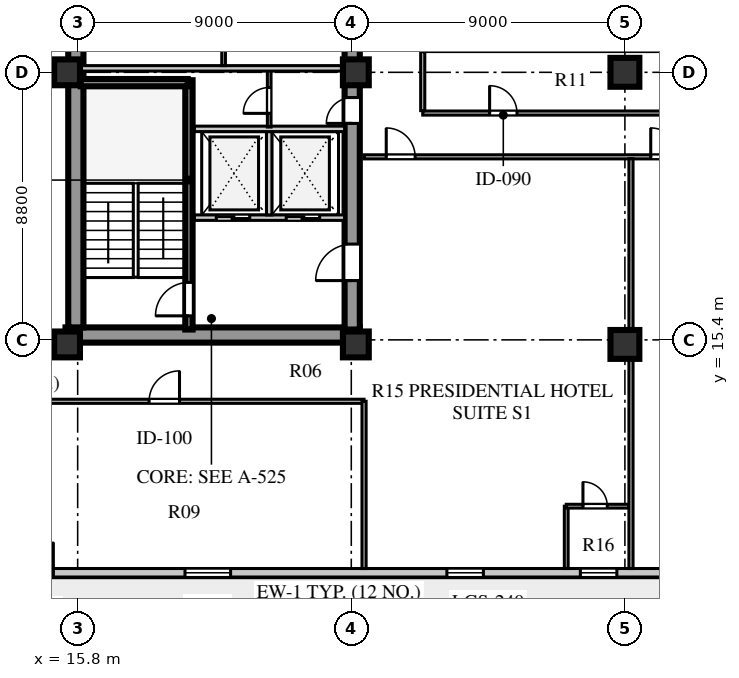
"""IFC4 building model, lengths in metres.
Left out: names, types, materials, properties, quantities, classifications, styles, units other than length and angle.
Written with IfcOpenShell. Run it as: python <this file> out.ifc"""

import sys

from ifc_helpers import new_model, si_unit, direction, frame, frame_2d, origin, origin_2d, place, context, subcontext, project, spatial, rectangle, extrude, element, fill, save


model = new_model("IFC4")
c1 = context("Model", 3, precision=1e-05, world=origin(), true_north=direction((0.0, 1.0)))
c2 = subcontext(c1, "Body", "Model", "MODEL_VIEW")
j1 = project(units=[si_unit("LENGTHUNIT", "METRE"), si_unit("PLANEANGLEUNIT", "RADIAN")], contexts=[c1])
p1 = place(None, origin())
s1 = spatial("IfcSite", under=j1, at=p1, CompositionType="ELEMENT")
p2 = place(p1, origin())
s2 = spatial("IfcBuilding", under=s1, at=p2, CompositionType="ELEMENT")
p3 = place(p2, frame((0.0, 0.0, 188.7)))
s3 = spatial("IfcBuildingStorey", under=s2, at=p3, CompositionType="ELEMENT", Elevation=188.7)
p4 = place(p3, frame((15.4, 15.56, 0.0), z_axis=(0.0, 0.0, 1.0), x_axis=(1.0, 0.0, 0.0)))
e1 = element("IfcWall", 1, at=p4, inside=s3, PredefinedType="SHEAR", context=c2, shape_type="SweptSolid", body=[
    extrude(rectangle(XDim=9.68, YDim=0.5, at=frame_2d((4.84, 0.0))), origin(), (0.0, 0.0, 1.0), 3.6),
])
p5 = place(p3, frame((15.74, 15.81, 0.0), z_axis=(0.0, 0.0, 1.0), x_axis=(0.0, 1.0, 0.0)))
e2 = element("IfcWall", 2, at=p5, inside=s3, PredefinedType="SHEAR", context=c2, shape_type="SweptSolid", body=[
    extrude(rectangle(XDim=25.63, YDim=0.5, at=frame_2d((12.815, 0.0))), origin(), (0.0, 0.0, 1.0), 3.6),
])
p6 = place(p3, frame((24.83, 15.74, 0.0), z_axis=(0.0, 0.0, 1.0), x_axis=(0.0, 1.0, 0.0)))
e3 = element("IfcWall", 3, at=p6, inside=s3, PredefinedType="SHEAR", context=c2, shape_type="SweptSolid", body=[
    extrude(rectangle(XDim=25.76, YDim=0.5, at=frame_2d((12.88, 0.0))), origin(), (0.0, 0.0, 1.0), 3.6),
])
p7 = place(p6, frame((1.61, 0.0, 0.0)))
e4 = element("IfcOpeningElement", 4, at=p7, cuts=e3, PredefinedType="OPENING", context=c2, shape_type="SweptSolid", body=[
    extrude(rectangle(XDim=1.2, YDim=2.1, at=frame_2d((0.6, 1.05))), frame((0.0, 0.26, 0.0), z_axis=(0.0, -1.0, 0.0), x_axis=(1.0, 0.0, 0.0)), (0.0, 0.0, 1.0), 0.52),
])
p8 = place(p6, frame((6.78, 0.0, 0.0)))
e5 = element("IfcOpeningElement", 5, at=p8, cuts=e3, PredefinedType="OPENING", context=c2, shape_type="SweptSolid", body=[
    extrude(rectangle(XDim=0.85, YDim=2.06, at=frame_2d((0.425, 1.03))), frame((0.0, 0.26, 0.0), z_axis=(0.0, -1.0, 0.0), x_axis=(1.0, 0.0, 0.0)), (0.0, 0.0, 1.0), 0.52),
])
p9 = place(p6, frame((12.11, 0.0, 0.0)))
e6 = element("IfcOpeningElement", 6, at=p9, cuts=e3, PredefinedType="OPENING", context=c2, shape_type="SweptSolid", body=[
    extrude(rectangle(XDim=1.5, YDim=2.12, at=frame_2d((0.75, 1.06))), frame((0.0, 0.26, 0.0), z_axis=(0.0, -1.0, 0.0), x_axis=(1.0, 0.0, 0.0)), (0.0, 0.0, 1.0), 0.52),
])
p10 = place(p6, frame((20.11, 0.0, 0.0)))
e7 = element("IfcOpeningElement", 7, at=p10, cuts=e3, PredefinedType="OPENING", context=c2, shape_type="SweptSolid", body=[
    extrude(rectangle(XDim=1.2, YDim=2.12, at=frame_2d((0.6, 1.06))), frame((0.0, 0.26, 0.0), z_axis=(0.0, -1.0, 0.0), x_axis=(1.0, 0.0, 0.0)), (0.0, 0.0, 1.0), 0.52),
])
p11 = place(p6, frame((24.01, 0.0, 0.0)))
e8 = element("IfcOpeningElement", 8, at=p11, cuts=e3, PredefinedType="OPENING", context=c2, shape_type="SweptSolid", body=[
    extrude(rectangle(XDim=0.95, YDim=2.1, at=frame_2d((0.475, 1.05))), frame((0.0, 0.26, 0.0), z_axis=(0.0, -1.0, 0.0), x_axis=(1.0, 0.0, 0.0)), (0.0, 0.0, 1.0), 0.52),
])
for number, where, z_axis, x_axis in (
    (9, (15.45, 15.25, 0.0), (0.0, 0.0, 1.0), (1.0, 0.0, 0.0)),
    (10, (15.45, 24.2, 0.0), (0.0, 0.0, 1.0), (1.0, 0.0, 0.0)),
    (11, (24.95, 15.25, 0.0), (0.0, 0.0, 1.0), (1.0, 0.0, 0.0)),
    (12, (24.95, 24.2, 0.0), (0.0, 0.0, 1.0), (1.0, 0.0, 0.0)),
):
    element("IfcColumn", number, at=place(p3, frame(where, z_axis=z_axis, x_axis=x_axis)), inside=s3, PredefinedType="COLUMN", context=c2, shape_type="SweptSolid", body=[
        extrude(rectangle(XDim=0.85, YDim=0.85, at=origin_2d()), origin(), (0.0, 0.0, 1.0), 3.6),
    ])
for number, where, z_axis, x_axis in (
    (13, (33.8, 15.25, 0.0), (0.0, 0.0, 1.0), (1.0, 0.0, 0.0)),
    (14, (33.8, 24.2, 0.0), (0.0, 0.0, 1.0), (1.0, 0.0, 0.0)),
):
    element("IfcColumn", number, at=place(p3, frame(where, z_axis=z_axis, x_axis=x_axis)), inside=s3, PredefinedType="COLUMN", context=c2, shape_type="SweptSolid", body=[
        extrude(rectangle(XDim=0.95, YDim=0.95, at=origin_2d()), origin(), (0.0, 0.0, 1.0), 3.6),
    ])
p12 = place(p3, frame((13.05, 7.74, 0.0), z_axis=(0.0, 0.0, 1.0), x_axis=(1.0, 0.0, 0.0)))
e15 = element("IfcWall", 15, at=p12, inside=s3, PredefinedType="STANDARD", context=c2, shape_type="SweptSolid", body=[
    extrude(rectangle(XDim=32.5, YDim=0.28, at=frame_2d((16.25, 0.0))), origin(), (0.0, 0.0, 1.0), 3.6),
])
p13 = place(p12, frame((0.95, 0.0, 0.0)))
e16 = element("IfcOpeningElement", 16, at=p13, cuts=e15, PredefinedType="OPENING", context=c2, shape_type="SweptSolid", body=[
    extrude(rectangle(XDim=1.0, YDim=2.05, at=frame_2d((0.5, 1.025))), frame((0.0, 0.15, 0.0), z_axis=(0.0, -1.0, 0.0), x_axis=(1.0, 0.0, 0.0)), (0.0, 0.0, 1.0), 0.3),
])
p14 = place(p12, frame((6.28, 0.0, 0.8)))
e17 = element("IfcOpeningElement", 17, at=p14, cuts=e15, PredefinedType="OPENING", context=c2, shape_type="SweptSolid", body=[
    extrude(rectangle(XDim=1.5, YDim=2.0, at=frame_2d((0.75, 1.0))), frame((0.0, 0.15, 0.0), z_axis=(0.0, -1.0, 0.0), x_axis=(1.0, 0.0, 0.0)), (0.0, 0.0, 1.0), 0.3),
])
p15 = place(p12, frame((14.895, 0.0, 0.8)))
e18 = element("IfcOpeningElement", 18, at=p15, cuts=e15, PredefinedType="OPENING", context=c2, shape_type="SweptSolid", body=[
    extrude(rectangle(XDim=1.2, YDim=1.75, at=frame_2d((0.6, 0.875))), frame((0.0, 0.15, 0.0), z_axis=(0.0, -1.0, 0.0), x_axis=(1.0, 0.0, 0.0)), (0.0, 0.0, 1.0), 0.3),
])
p16 = place(p12, frame((19.285, 0.0, 0.8)))
e19 = element("IfcOpeningElement", 19, at=p16, cuts=e15, PredefinedType="OPENING", context=c2, shape_type="SweptSolid", body=[
    extrude(rectangle(XDim=1.2, YDim=1.75, at=frame_2d((0.6, 0.875))), frame((0.0, 0.15, 0.0), z_axis=(0.0, -1.0, 0.0), x_axis=(1.0, 0.0, 0.0)), (0.0, 0.0, 1.0), 0.3),
])
p17 = place(p12, frame((22.205, 0.0, 0.8)))
e20 = element("IfcOpeningElement", 20, at=p17, cuts=e15, PredefinedType="OPENING", context=c2, shape_type="SweptSolid", body=[
    extrude(rectangle(XDim=2.1, YDim=1.95, at=frame_2d((1.05, 0.975))), frame((0.0, 0.15, 0.0), z_axis=(0.0, -1.0, 0.0), x_axis=(1.0, 0.0, 0.0)), (0.0, 0.0, 1.0), 0.3),
])
p18 = place(p12, frame((26.065, 0.0, 0.8)))
e21 = element("IfcOpeningElement", 21, at=p18, cuts=e15, PredefinedType="OPENING", context=c2, shape_type="SweptSolid", body=[
    extrude(rectangle(XDim=1.2, YDim=1.75, at=frame_2d((0.6, 0.875))), frame((0.0, 0.15, 0.0), z_axis=(0.0, -1.0, 0.0), x_axis=(1.0, 0.0, 0.0)), (0.0, 0.0, 1.0), 0.3),
])
p19 = place(p12, frame((29.255, 0.0, 0.8)))
e22 = element("IfcOpeningElement", 22, at=p19, cuts=e15, PredefinedType="OPENING", context=c2, shape_type="SweptSolid", body=[
    extrude(rectangle(XDim=1.65, YDim=1.95, at=frame_2d((0.825, 0.975))), frame((0.0, 0.15, 0.0), z_axis=(0.0, -1.0, 0.0), x_axis=(1.0, 0.0, 0.0)), (0.0, 0.0, 1.0), 0.3),
])
p20 = place(p3, frame((19.46, 15.74, 0.0), z_axis=(0.0, 0.0, 1.0), x_axis=(0.0, 1.0, 0.0)))
e23 = element("IfcWall", 23, at=p20, inside=s3, PredefinedType="SHEAR", context=c2, shape_type="SweptSolid", body=[
    extrude(rectangle(XDim=8.2, YDim=0.24, at=frame_2d((4.1, 0.0))), origin(), (0.0, 0.0, 1.0), 3.85),
])
p21 = place(p20, frame((0.45, 0.0, 0.0)))
e24 = element("IfcOpeningElement", 24, at=p21, cuts=e23, PredefinedType="OPENING", context=c2, shape_type="SweptSolid", body=[
    extrude(rectangle(XDim=1.1, YDim=2.1, at=frame_2d((0.55, 1.05))), frame((0.0, 0.13, 0.0), z_axis=(0.0, -1.0, 0.0), x_axis=(1.0, 0.0, 0.0)), (0.0, 0.0, 1.0), 0.26),
])
p22 = place(p3, frame((15.9, 23.86, 0.0), z_axis=(0.0, 0.0, 1.0), x_axis=(1.0, 0.0, 0.0)))
e25 = element("IfcWall", 25, at=p22, inside=s3, PredefinedType="SHEAR", context=c2, shape_type="SweptSolid", body=[
    extrude(rectangle(XDim=3.52, YDim=0.24, at=frame_2d((1.76, 0.0))), origin(), (0.0, 0.0, 1.0), 3.85),
])
p23 = place(p3, frame((19.64, 19.42, 0.0), z_axis=(0.0, 0.0, 1.0), x_axis=(1.0, 0.0, 0.0)))
e26 = element("IfcWall", 26, at=p23, inside=s3, PredefinedType="SOLIDWALL", context=c2, shape_type="SweptSolid", body=[
    extrude(rectangle(XDim=4.94, YDim=0.18, at=frame_2d((2.47, 0.0))), origin(), (0.0, 0.0, 1.0), 3.6),
])
p24 = place(p23, frame((0.72, 0.0, 0.0)))
e27 = element("IfcOpeningElement", 27, at=p24, cuts=e26, PredefinedType="OPENING", context=c2, shape_type="SweptSolid", body=[
    extrude(rectangle(XDim=1.1, YDim=2.1, at=frame_2d((0.55, 1.05))), frame((0.0, 0.1, 0.0), z_axis=(0.0, -1.0, 0.0), x_axis=(1.0, 0.0, 0.0)), (0.0, 0.0, 1.0), 0.2),
])
p25 = place(p23, frame((3.02, 0.0, 0.0)))
e28 = element("IfcOpeningElement", 28, at=p25, cuts=e26, PredefinedType="OPENING", context=c2, shape_type="SweptSolid", body=[
    extrude(rectangle(XDim=1.1, YDim=2.1, at=frame_2d((0.55, 1.05))), frame((0.0, 0.1, 0.0), z_axis=(0.0, -1.0, 0.0), x_axis=(1.0, 0.0, 0.0)), (0.0, 0.0, 1.0), 0.2),
])
p26 = place(p3, frame((22.1, 19.51, 0.0), z_axis=(0.0, 0.0, 1.0), x_axis=(0.0, 1.0, 0.0)))
e29 = element("IfcWall", 29, at=p26, inside=s3, PredefinedType="SOLIDWALL", context=c2, shape_type="SweptSolid", body=[
    extrude(rectangle(XDim=2.74, YDim=0.18, at=frame_2d((1.37, 0.0))), origin(), (0.0, 0.0, 1.0), 3.6),
])
p27 = place(p3, frame((19.64, 22.34, 0.0), z_axis=(0.0, 0.0, 1.0), x_axis=(1.0, 0.0, 0.0)))
e30 = element("IfcWall", 30, at=p27, inside=s3, PredefinedType="SOLIDWALL", context=c2, shape_type="SweptSolid", body=[
    extrude(rectangle(XDim=4.94, YDim=0.18, at=frame_2d((2.47, 0.0))), origin(), (0.0, 0.0, 1.0), 3.6),
])
p28 = place(p3, frame((22.1, 22.4, 0.0), z_axis=(0.0, 0.0, 1.0), x_axis=(0.0, 1.0, 0.0)))
e31 = element("IfcWall", 31, at=p28, inside=s3, PredefinedType="PARTITIONING", context=c2, shape_type="SweptSolid", body=[
    extrude(rectangle(XDim=1.88, YDim=0.12, at=frame_2d((0.94, 0.0))), origin(), (0.0, 0.0, 1.0), 3.6),
])
p29 = place(p28, frame((0.45, 0.0, 0.0)))
e32 = element("IfcOpeningElement", 32, at=p29, cuts=e31, PredefinedType="OPENING", context=c2, shape_type="SweptSolid", body=[
    extrude(rectangle(XDim=0.85, YDim=2.06, at=frame_2d((0.425, 1.03))), frame((0.0, 0.07, 0.0), z_axis=(0.0, -1.0, 0.0), x_axis=(1.0, 0.0, 0.0)), (0.0, 0.0, 1.0), 0.14),
])
p30 = place(p3, frame((15.9, 24.33, 0.0), z_axis=(0.0, 0.0, 1.0), x_axis=(1.0, 0.0, 0.0)))
e33 = element("IfcWall", 33, at=p30, inside=s3, PredefinedType="SOLIDWALL", context=c2, shape_type="SweptSolid", body=[
    extrude(rectangle(XDim=8.68, YDim=0.18, at=frame_2d((4.34, 0.0))), origin(), (0.0, 0.0, 1.0), 2.95),
])
p31 = place(p3, frame((20.6, 24.42, 0.0), z_axis=(0.0, 0.0, 1.0), x_axis=(0.0, 1.0, 0.0)))
e34 = element("IfcWall", 34, at=p31, inside=s3, PredefinedType="PARTITIONING", context=c2, shape_type="SweptSolid", body=[
    extrude(rectangle(XDim=2.02, YDim=0.12, at=frame_2d((1.01, 0.0))), origin(), (0.0, 0.0, 1.0), 3.6),
])
p32 = place(p3, frame((25.22, 21.42, 0.0), z_axis=(0.0, 0.0, 1.0), x_axis=(1.0, 0.0, 0.0)))
e35 = element("IfcWall", 35, at=p32, inside=s3, PredefinedType="PARTITIONING", context=c2, shape_type="SweptSolid", body=[
    extrude(rectangle(XDim=15.6, YDim=0.135, at=frame_2d((7.8, 0.0))), origin(), (0.0, 0.0, 1.0), 3.25),
])
p33 = place(p32, frame((0.73, 0.0, 0.0)))
e36 = element("IfcOpeningElement", 36, at=p33, cuts=e35, PredefinedType="OPENING", context=c2, shape_type="SweptSolid", body=[
    extrude(rectangle(XDim=0.95, YDim=2.1, at=frame_2d((0.475, 1.05))), frame((0.0, 0.078, 0.0), z_axis=(0.0, -1.0, 0.0), x_axis=(1.0, 0.0, 0.0)), (0.0, 0.0, 1.0), 0.155),
])
p34 = place(p32, frame((9.43, 0.0, 0.0)))
e37 = element("IfcOpeningElement", 37, at=p34, cuts=e35, PredefinedType="OPENING", context=c2, shape_type="SweptSolid", body=[
    extrude(rectangle(XDim=0.95, YDim=2.1, at=frame_2d((0.475, 1.05))), frame((0.0, 0.078, 0.0), z_axis=(0.0, -1.0, 0.0), x_axis=(1.0, 0.0, 0.0)), (0.0, 0.0, 1.0), 0.155),
])
p35 = place(p3, frame((27.15, 22.86, 0.0), z_axis=(0.0, 0.0, 1.0), x_axis=(1.0, 0.0, 0.0)))
e38 = element("IfcWall", 38, at=p35, inside=s3, PredefinedType="PARTITIONING", context=c2, shape_type="SweptSolid", body=[
    extrude(rectangle(XDim=13.67, YDim=0.135, at=frame_2d((6.835, 0.0))), origin(), (0.0, 0.0, 1.0), 3.6),
])
p36 = place(p35, frame((2.2, 0.0, 0.0)))
e39 = element("IfcOpeningElement", 39, at=p36, cuts=e38, PredefinedType="OPENING", context=c2, shape_type="SweptSolid", body=[
    extrude(rectangle(XDim=0.9, YDim=2.08, at=frame_2d((0.45, 1.04))), frame((0.0, 0.078, 0.0), z_axis=(0.0, -1.0, 0.0), x_axis=(1.0, 0.0, 0.0)), (0.0, 0.0, 1.0), 0.155),
])
p37 = place(p3, frame((13.39, 13.38, 0.0), z_axis=(0.0, 0.0, 1.0), x_axis=(1.0, 0.0, 0.0)))
e40 = element("IfcWall", 40, at=p37, inside=s3, PredefinedType="PARTITIONING", context=c2, shape_type="SweptSolid", body=[
    extrude(rectangle(XDim=11.83, YDim=0.135, at=frame_2d((5.915, 0.0))), origin(), (0.0, 0.0, 1.0), 3.6),
])
p38 = place(p37, frame((4.76, 0.0, 0.0)))
e41 = element("IfcOpeningElement", 41, at=p38, cuts=e40, PredefinedType="OPENING", context=c2, shape_type="SweptSolid", body=[
    extrude(rectangle(XDim=1.0, YDim=2.08, at=frame_2d((0.5, 1.04))), frame((0.0, 0.078, 0.0), z_axis=(0.0, -1.0, 0.0), x_axis=(1.0, 0.0, 0.0)), (0.0, 0.0, 1.0), 0.155),
])
p39 = place(p3, frame((25.22, 7.88, 0.0), z_axis=(0.0, 0.0, 1.0), x_axis=(0.0, 1.0, 0.0)))
e42 = element("IfcWall", 42, at=p39, inside=s3, PredefinedType="PARTITIONING", context=c2, shape_type="SweptSolid", body=[
    extrude(rectangle(XDim=5.5, YDim=0.135, at=frame_2d((2.75, 0.0))), origin(), (0.0, 0.0, 1.0), 3.15),
])
p40 = place(p3, frame((27.15, 22.94, 0.0), z_axis=(0.0, 0.0, 1.0), x_axis=(0.0, 1.0, 0.0)))
e43 = element("IfcWall", 43, at=p40, inside=s3, PredefinedType="PARTITIONING", context=c2, shape_type="SweptSolid", body=[
    extrude(rectangle(XDim=1.94, YDim=0.135, at=frame_2d((0.97, 0.0))), origin(), (0.0, 0.0, 1.0), 3.6),
])
p41 = place(p3, frame((31.87, 7.88, 0.0), z_axis=(0.0, 0.0, 1.0), x_axis=(0.0, 1.0, 0.0)))
e44 = element("IfcWall", 44, at=p41, inside=s3, PredefinedType="PLUMBINGWALL", context=c2, shape_type="SweptSolid", body=[
    extrude(rectangle(XDim=2.05, YDim=0.125, at=frame_2d((1.025, 0.0))), origin(), (0.0, 0.0, 1.0), 3.6),
])
p42 = place(p3, frame((31.87, 9.93, 0.0), z_axis=(0.0, 0.0, 1.0), x_axis=(1.0, 0.0, 0.0)))
e45 = element("IfcWall", 45, at=p42, inside=s3, PredefinedType="PLUMBINGWALL", context=c2, shape_type="SweptSolid", body=[
    extrude(rectangle(XDim=2.05, YDim=0.125, at=frame_2d((1.025, 0.0))), origin(), (0.0, 0.0, 1.0), 3.6),
])
p43 = place(p42, frame((0.55, 0.0, 0.0)))
e46 = element("IfcOpeningElement", 46, at=p43, cuts=e45, PredefinedType="OPENING", context=c2, shape_type="SweptSolid", body=[
    extrude(rectangle(XDim=0.8, YDim=2.05, at=frame_2d((0.4, 1.025))), frame((0.0, 0.073, 0.0), z_axis=(0.0, -1.0, 0.0), x_axis=(1.0, 0.0, 0.0)), (0.0, 0.0, 1.0), 0.145),
])
p44 = place(p3, frame((34.0, 7.88, 0.0), z_axis=(0.0, 0.0, 1.0), x_axis=(0.0, 1.0, 0.0)))
e47 = element("IfcWall", 47, at=p44, inside=s3, PredefinedType="PARTITIONING", context=c2, shape_type="SweptSolid", body=[
    extrude(rectangle(XDim=13.48, YDim=0.135, at=frame_2d((6.74, 0.0))), origin(), (0.0, 0.0, 1.0), 2.95),
])
p45 = place(p13, frame((1.0, 0.0, 0.0), z_axis=(0.0, 0.0, 1.0), x_axis=(-1.0, 0.0, 0.0)))
e48 = element("IfcDoor", 48, at=p45, inside=s3, OperationType="SINGLE_SWING_LEFT", PredefinedType="DOOR", context=c2, shape_type="SweptSolid", body=[
    extrude(rectangle(XDim=1.0, YDim=2.05, at=frame_2d((0.5, 1.025))), frame((0.0, 0.025, 0.0), z_axis=(0.0, -1.0, 0.0), x_axis=(1.0, 0.0, 0.0)), (0.0, 0.0, 1.0), 0.05),
])
fill(e16, e48)
p46 = place(p14, origin())
e49 = element("IfcWindow", 49, at=p46, inside=s3, PartitioningType="SINGLE_PANEL", PredefinedType="WINDOW", context=c2, shape_type="SweptSolid", body=[
    extrude(rectangle(XDim=1.5, YDim=2.0, at=frame_2d((0.75, 1.0))), frame((0.0, 0.03, 0.0), z_axis=(0.0, -1.0, 0.0), x_axis=(1.0, 0.0, 0.0)), (0.0, 0.0, 1.0), 0.06),
])
fill(e17, e49)
p47 = place(p15, origin())
e50 = element("IfcWindow", 50, at=p47, inside=s3, PartitioningType="SINGLE_PANEL", PredefinedType="WINDOW", context=c2, shape_type="SweptSolid", body=[
    extrude(rectangle(XDim=1.2, YDim=1.75, at=frame_2d((0.6, 0.875))), frame((0.0, 0.03, 0.0), z_axis=(0.0, -1.0, 0.0), x_axis=(1.0, 0.0, 0.0)), (0.0, 0.0, 1.0), 0.06),
])
fill(e18, e50)
p48 = place(p16, origin())
e51 = element("IfcWindow", 51, at=p48, inside=s3, PartitioningType="SINGLE_PANEL", PredefinedType="WINDOW", context=c2, shape_type="SweptSolid", body=[
    extrude(rectangle(XDim=1.2, YDim=1.75, at=frame_2d((0.6, 0.875))), frame((0.0, 0.03, 0.0), z_axis=(0.0, -1.0, 0.0), x_axis=(1.0, 0.0, 0.0)), (0.0, 0.0, 1.0), 0.06),
])
fill(e19, e51)
p49 = place(p21, origin())
e52 = element("IfcDoor", 52, at=p49, inside=s3, OperationType="SINGLE_SWING_LEFT", PredefinedType="DOOR", context=c2, shape_type="SweptSolid", body=[
    extrude(rectangle(XDim=1.1, YDim=2.1, at=frame_2d((0.55, 1.05))), frame((0.0, 0.025, 0.0), z_axis=(0.0, -1.0, 0.0), x_axis=(1.0, 0.0, 0.0)), (0.0, 0.0, 1.0), 0.05),
])
fill(e24, e52)
p50 = place(p24, origin())
e53 = element("IfcDoor", 53, at=p50, inside=s3, OperationType="DOUBLE_DOOR_SLIDING", PredefinedType="DOOR", context=c2, shape_type="SweptSolid", body=[
    extrude(rectangle(XDim=1.1, YDim=2.1, at=frame_2d((0.55, 1.05))), frame((0.0, 0.025, 0.0), z_axis=(0.0, -1.0, 0.0), x_axis=(1.0, 0.0, 0.0)), (0.0, 0.0, 1.0), 0.05),
])
fill(e27, e53)
p51 = place(p25, origin())
e54 = element("IfcDoor", 54, at=p51, inside=s3, OperationType="DOUBLE_DOOR_SLIDING", PredefinedType="DOOR", context=c2, shape_type="SweptSolid", body=[
    extrude(rectangle(XDim=1.1, YDim=2.1, at=frame_2d((0.55, 1.05))), frame((0.0, 0.025, 0.0), z_axis=(0.0, -1.0, 0.0), x_axis=(1.0, 0.0, 0.0)), (0.0, 0.0, 1.0), 0.05),
])
fill(e28, e54)
p52 = place(p7, frame((1.2, 0.0, 0.0), z_axis=(0.0, 0.0, 1.0), x_axis=(-1.0, 0.0, 0.0)))
e55 = element("IfcDoor", 55, at=p52, inside=s3, OperationType="SINGLE_SWING_RIGHT", PredefinedType="DOOR", context=c2, shape_type="SweptSolid", body=[
    extrude(rectangle(XDim=1.2, YDim=2.1, at=frame_2d((0.6, 1.05))), frame((0.0, 0.025, 0.0), z_axis=(0.0, -1.0, 0.0), x_axis=(1.0, 0.0, 0.0)), (0.0, 0.0, 1.0), 0.05),
])
fill(e4, e55)
p53 = place(p29, origin())
e56 = element("IfcDoor", 56, at=p53, inside=s3, OperationType="SINGLE_SWING_LEFT", PredefinedType="DOOR", context=c2, shape_type="SweptSolid", body=[
    extrude(rectangle(XDim=0.85, YDim=2.06, at=frame_2d((0.425, 1.03))), frame((0.0, 0.025, 0.0), z_axis=(0.0, -1.0, 0.0), x_axis=(1.0, 0.0, 0.0)), (0.0, 0.0, 1.0), 0.05),
])
fill(e32, e56)
p54 = place(p8, frame((0.85, 0.0, 0.0), z_axis=(0.0, 0.0, 1.0), x_axis=(-1.0, 0.0, 0.0)))
e57 = element("IfcDoor", 57, at=p54, inside=s3, OperationType="SINGLE_SWING_RIGHT", PredefinedType="DOOR", context=c2, shape_type="SweptSolid", body=[
    extrude(rectangle(XDim=0.85, YDim=2.06, at=frame_2d((0.425, 1.03))), frame((0.0, 0.025, 0.0), z_axis=(0.0, -1.0, 0.0), x_axis=(1.0, 0.0, 0.0)), (0.0, 0.0, 1.0), 0.05),
])
fill(e5, e57)
p55 = place(p38, frame((1.0, 0.0, 0.0), z_axis=(0.0, 0.0, 1.0), x_axis=(-1.0, 0.0, 0.0)))
e58 = element("IfcDoor", 58, at=p55, inside=s3, OperationType="SINGLE_SWING_LEFT", PredefinedType="DOOR", context=c2, shape_type="SweptSolid", body=[
    extrude(rectangle(XDim=1.0, YDim=2.08, at=frame_2d((0.5, 1.04))), frame((0.0, 0.025, 0.0), z_axis=(0.0, -1.0, 0.0), x_axis=(1.0, 0.0, 0.0)), (0.0, 0.0, 1.0), 0.05),
])
fill(e41, e58)
p56 = place(p36, origin())
e59 = element("IfcDoor", 59, at=p56, inside=s3, OperationType="SINGLE_SWING_LEFT", PredefinedType="DOOR", context=c2, shape_type="SweptSolid", body=[
    extrude(rectangle(XDim=0.9, YDim=2.08, at=frame_2d((0.45, 1.04))), frame((0.0, 0.025, 0.0), z_axis=(0.0, -1.0, 0.0), x_axis=(1.0, 0.0, 0.0)), (0.0, 0.0, 1.0), 0.05),
])
fill(e39, e59)
p57 = place(p33, frame((0.95, 0.0, 0.0), z_axis=(0.0, 0.0, 1.0), x_axis=(-1.0, 0.0, 0.0)))
e60 = element("IfcDoor", 60, at=p57, inside=s3, OperationType="SINGLE_SWING_RIGHT", PredefinedType="DOOR", context=c2, shape_type="SweptSolid", body=[
    extrude(rectangle(XDim=0.95, YDim=2.1, at=frame_2d((0.475, 1.05))), frame((0.0, 0.025, 0.0), z_axis=(0.0, -1.0, 0.0), x_axis=(1.0, 0.0, 0.0)), (0.0, 0.0, 1.0), 0.05),
])
fill(e36, e60)
p58 = place(p43, origin())
e61 = element("IfcDoor", 61, at=p58, inside=s3, OperationType="SINGLE_SWING_LEFT", PredefinedType="DOOR", context=c2, shape_type="SweptSolid", body=[
    extrude(rectangle(XDim=0.8, YDim=2.05, at=frame_2d((0.4, 1.025))), frame((0.0, 0.025, 0.0), z_axis=(0.0, -1.0, 0.0), x_axis=(1.0, 0.0, 0.0)), (0.0, 0.0, 1.0), 0.05),
])
fill(e46, e61)
p59 = place(p34, frame((0.95, 0.0, 0.0), z_axis=(0.0, 0.0, 1.0), x_axis=(-1.0, 0.0, 0.0)))
e62 = element("IfcDoor", 62, at=p59, inside=s3, OperationType="SINGLE_SWING_RIGHT", PredefinedType="DOOR", context=c2, shape_type="SweptSolid", body=[
    extrude(rectangle(XDim=0.95, YDim=2.1, at=frame_2d((0.475, 1.05))), frame((0.0, 0.025, 0.0), z_axis=(0.0, -1.0, 0.0), x_axis=(1.0, 0.0, 0.0)), (0.0, 0.0, 1.0), 0.05),
])
fill(e37, e62)
save(model, sys.argv[1])
